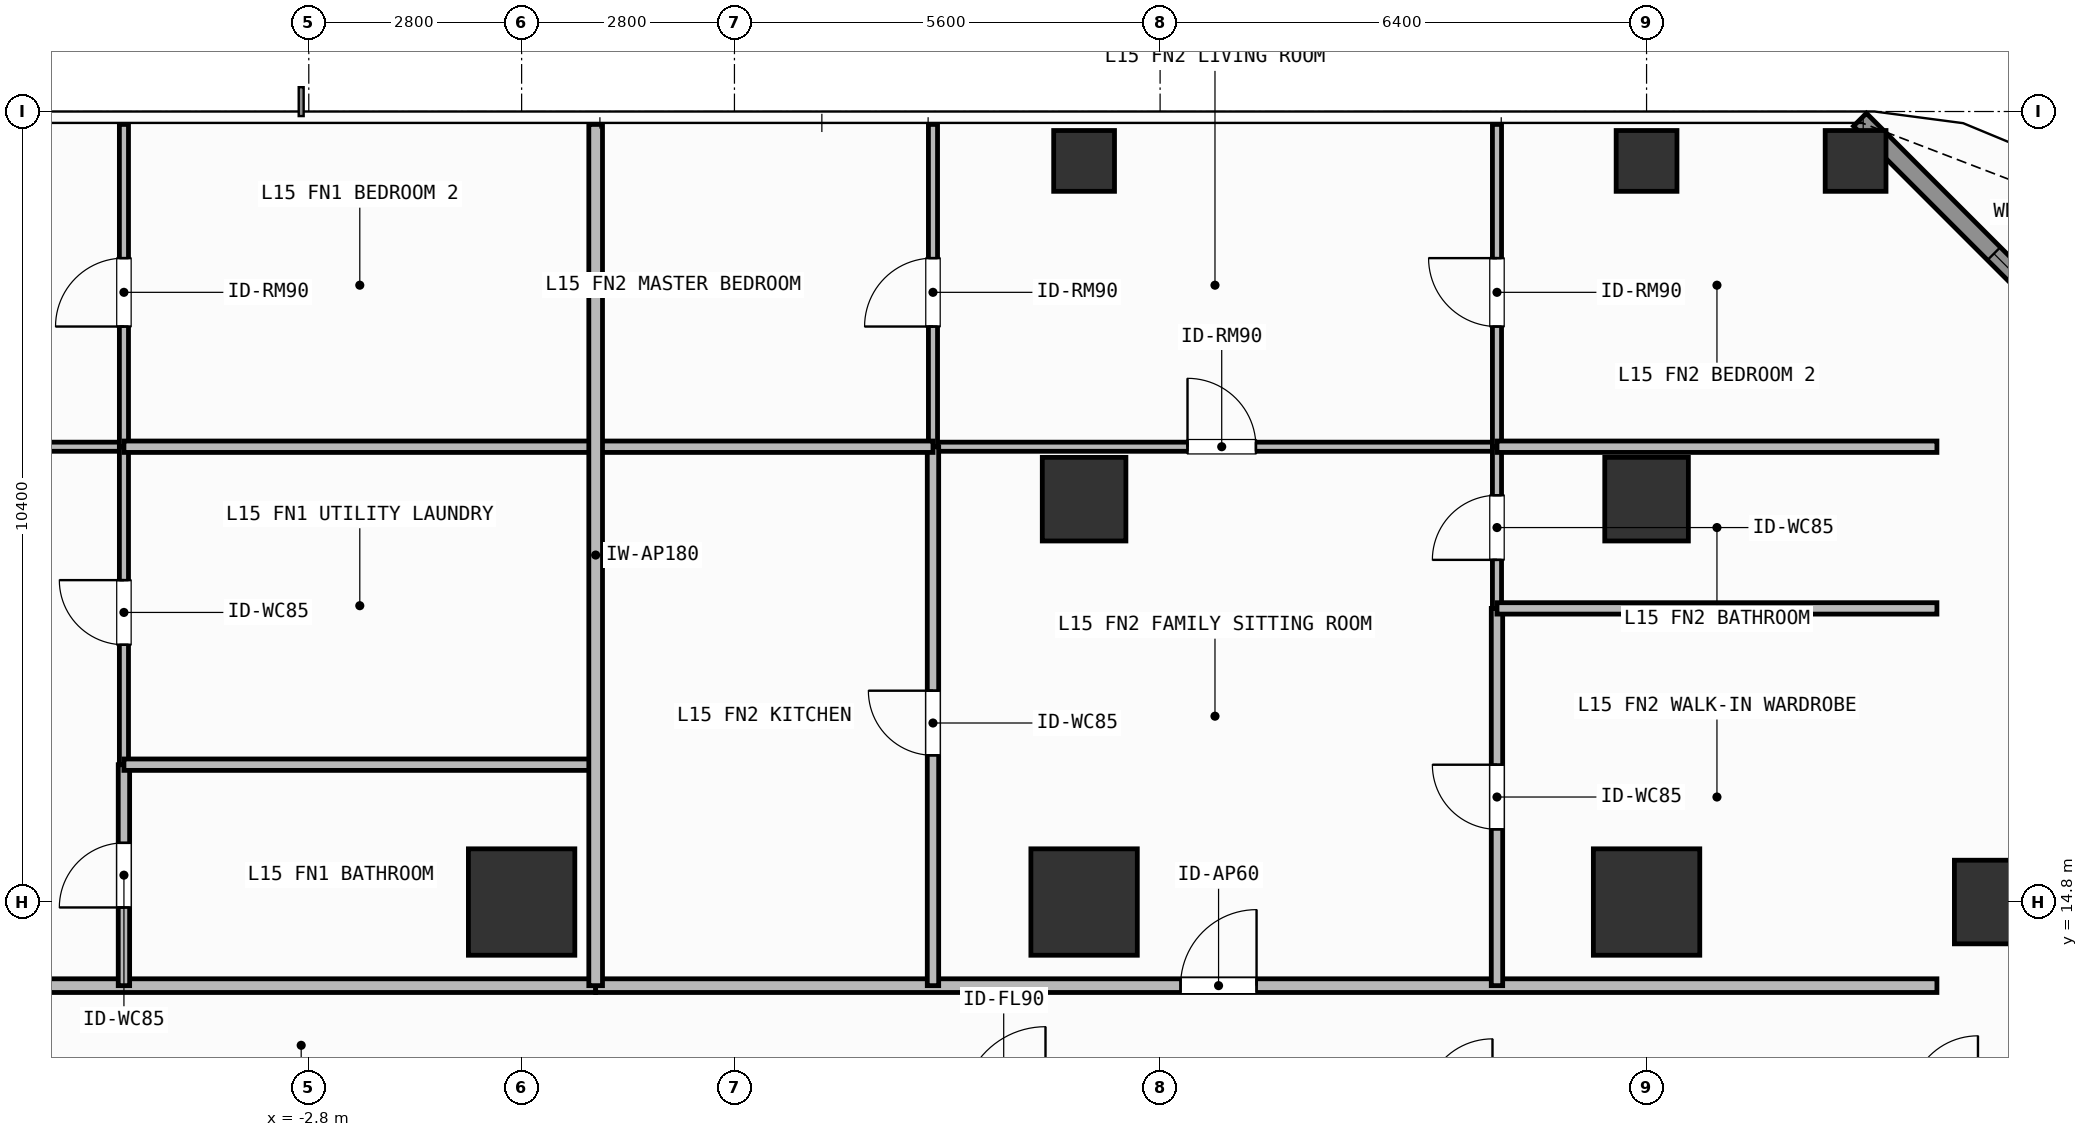
"""IFC4 building model, lengths in metres.
Left out: names, types, materials, properties, quantities, classifications, styles, units other than length and angle.
Written with IfcOpenShell. Run it as: python <this file> out.ifc"""

import sys

from ifc_helpers import new_model, si_unit, direction, frame, frame_2d, origin, origin_2d, place, context, subcontext, project, spatial, rectangle, hollow_rectangle, extrude, element, fill, save


model = new_model("IFC4")
c1 = context("Model", 3, precision=1e-05, world=origin(), true_north=direction((0.0, 1.0)))
c2 = subcontext(c1, "Body", "Model", "MODEL_VIEW")
j1 = project(units=[si_unit("LENGTHUNIT", "METRE"), si_unit("PLANEANGLEUNIT", "RADIAN")], contexts=[c1])
p1 = place(None, origin())
s1 = spatial("IfcSite", under=j1, at=p1, CompositionType="ELEMENT")
p2 = place(p1, origin())
s2 = spatial("IfcBuilding", under=s1, at=p2, CompositionType="ELEMENT")
p3 = place(p2, frame((0.0, 0.0, 57.9)))
s3 = spatial("IfcBuildingStorey", under=s2, at=p3, CompositionType="ELEMENT", Elevation=57.9)
for number, where, z_axis, x_axis in (
    (1, (0.0, 14.8, 0.0), (0.0, 0.0, 1.0), (1.0, 0.0, 0.0)),
    (2, (7.4, 14.8, 0.0), (0.0, 0.0, 1.0), (1.0, 0.0, 0.0)),
    (3, (14.8, 14.8, 0.0), (0.0, 0.0, 1.0), (1.0, 0.0, 0.0)),
):
    element("IfcColumn", number, at=place(p3, frame(where, z_axis=z_axis, x_axis=x_axis)), inside=s3, PredefinedType="COLUMN", context=c2, shape_type="SweptSolid", body=[
        extrude(rectangle(XDim=1.4, YDim=1.4, at=origin_2d()), origin(), (0.0, 0.0, 1.0), 3.9),
    ])
for number, where, z_axis, x_axis in (
    (4, (19.4, 14.8, 0.0), (0.0, 0.0, 1.0), (1.0, 0.0, 0.0)),
    (5, (7.4, 20.1, 0.0), (0.0, 0.0, 1.0), (1.0, 0.0, 0.0)),
    (6, (14.8, 20.1, 0.0), (0.0, 0.0, 1.0), (1.0, 0.0, 0.0)),
):
    element("IfcColumn", number, at=place(p3, frame(where, z_axis=z_axis, x_axis=x_axis)), inside=s3, PredefinedType="COLUMN", context=c2, shape_type="SweptSolid", body=[
        extrude(rectangle(XDim=1.1, YDim=1.1, at=origin_2d()), origin(), (0.0, 0.0, 1.0), 3.9),
    ])
for number, where, z_axis, x_axis in (
    (7, (17.55, 24.55, 0.0), (0.0, 0.0, 1.0), (1.0, 0.0, 0.0)),
    (8, (7.4, 24.55, 0.0), (0.0, 0.0, 1.0), (1.0, 0.0, 0.0)),
    (9, (14.8, 24.55, 0.0), (0.0, 0.0, 1.0), (1.0, 0.0, 0.0)),
):
    element("IfcColumn", number, at=place(p3, frame(where, z_axis=z_axis, x_axis=x_axis)), inside=s3, PredefinedType="COLUMN", context=c2, shape_type="SweptSolid", body=[
        extrude(hollow_rectangle(XDim=0.8, YDim=0.8, WallThickness=0.036, at=origin_2d()), origin(), (0.0, 0.0, 1.0), 3.9),
    ])
p4 = place(p3, frame((17.608, 25.092, 0.0), z_axis=(0.0, 0.0, 1.0), x_axis=(0.707106781187, -0.707106781187, 0.0)))
e10 = element("IfcWall", 10, at=p4, inside=s3, PredefinedType="SOLIDWALL", context=c2, shape_type="SweptSolid", body=[
    extrude(rectangle(XDim=6.484, YDim=0.24, at=frame_2d((3.242, 0.0))), origin(), (0.0, 0.0, 1.0), 3.68),
])
p5 = place(p4, frame((2.492, 0.0, 0.8)))
e11 = element("IfcOpeningElement", 11, at=p5, cuts=e10, PredefinedType="OPENING", context=c2, shape_type="SweptSolid", body=[
    extrude(rectangle(XDim=1.5, YDim=1.85, at=frame_2d((0.75, 0.925))), frame((0.0, 0.13, 0.0), z_axis=(0.0, -1.0, 0.0), x_axis=(1.0, 0.0, 0.0)), (0.0, 0.0, 1.0), 0.26),
])
p6 = place(p3, frame((-24.42, 13.7, 0.0), z_axis=(0.0, 0.0, 1.0), x_axis=(1.0, 0.0, 0.0)))
e12 = element("IfcWall", 12, at=p6, inside=s3, PredefinedType="PARTITIONING", context=c2, shape_type="SweptSolid", body=[
    extrude(rectangle(XDim=25.394, YDim=0.18, at=frame_2d((12.697, 0.0))), origin(), (0.0, 0.0, 1.0), 3.68),
])
p7 = place(p6, frame((10.4, 0.0, 0.0)))
e13 = element("IfcOpeningElement", 13, at=p7, cuts=e12, PredefinedType="OPENING", context=c2, shape_type="SweptSolid", body=[
    extrude(rectangle(XDim=1.0, YDim=2.2, at=frame_2d((0.5, 1.1))), frame((0.0, 0.1, 0.0), z_axis=(0.0, -1.0, 0.0), x_axis=(1.0, 0.0, 0.0)), (0.0, 0.0, 1.0), 0.2),
])
p8 = place(p3, frame((-12.805, 20.79, 0.0), z_axis=(0.0, 0.0, 1.0), x_axis=(1.0, 0.0, 0.0)))
e14 = element("IfcWall", 14, at=p8, inside=s3, PredefinedType="PARTITIONING", context=c2, shape_type="SweptSolid", body=[
    extrude(rectangle(XDim=7.573, YDim=0.12, at=frame_2d((3.787, 0.0))), origin(), (0.0, 0.0, 1.0), 3.68),
])
p9 = place(p8, frame((3.336, 0.0, 0.0)))
e15 = element("IfcOpeningElement", 15, at=p9, cuts=e14, PredefinedType="OPENING", context=c2, shape_type="SweptSolid", body=[
    extrude(rectangle(XDim=0.9, YDim=2.1, at=frame_2d((0.45, 1.05))), frame((0.0, 0.07, 0.0), z_axis=(0.0, -1.0, 0.0), x_axis=(1.0, 0.0, 0.0)), (0.0, 0.0, 1.0), 0.14),
])
p10 = place(p3, frame((-5.232, 13.7, 0.0), z_axis=(0.0, 0.0, 1.0), x_axis=(0.0, 1.0, 0.0)))
e16 = element("IfcWall", 16, at=p10, inside=s3, PredefinedType="PARTITIONING", context=c2, shape_type="SweptSolid", body=[
    extrude(rectangle(XDim=2.907, YDim=0.15, at=frame_2d((1.454, 0.0))), origin(), (0.0, 0.0, 1.0), 3.68),
])
p11 = place(p10, frame((1.029, 0.0, 0.0)))
e17 = element("IfcOpeningElement", 17, at=p11, cuts=e16, PredefinedType="OPENING", context=c2, shape_type="SweptSolid", body=[
    extrude(rectangle(XDim=0.85, YDim=2.1, at=frame_2d((0.425, 1.05))), frame((0.0, 0.085, 0.0), z_axis=(0.0, -1.0, 0.0), x_axis=(1.0, 0.0, 0.0)), (0.0, 0.0, 1.0), 0.17),
])
p12 = place(p3, frame((-5.232, 16.607, 0.0), z_axis=(0.0, 0.0, 1.0), x_axis=(0.0, 1.0, 0.0)))
e18 = element("IfcWall", 18, at=p12, inside=s3, PredefinedType="PARTITIONING", context=c2, shape_type="SweptSolid", body=[
    extrude(rectangle(XDim=4.183, YDim=0.12, at=frame_2d((2.092, 0.0))), origin(), (0.0, 0.0, 1.0), 3.68),
])
p13 = place(p12, frame((1.578, 0.0, 0.0)))
e19 = element("IfcOpeningElement", 19, at=p13, cuts=e18, PredefinedType="OPENING", context=c2, shape_type="SweptSolid", body=[
    extrude(rectangle(XDim=0.85, YDim=2.1, at=frame_2d((0.425, 1.05))), frame((0.0, 0.07, 0.0), z_axis=(0.0, -1.0, 0.0), x_axis=(1.0, 0.0, 0.0)), (0.0, 0.0, 1.0), 0.14),
])
p14 = place(p3, frame((-5.232, 20.79, 0.0), z_axis=(0.0, 0.0, 1.0), x_axis=(0.0, 1.0, 0.0)))
e20 = element("IfcWall", 20, at=p14, inside=s3, PredefinedType="PARTITIONING", context=c2, shape_type="SweptSolid", body=[
    extrude(rectangle(XDim=4.24, YDim=0.12, at=frame_2d((2.12, 0.0))), origin(), (0.0, 0.0, 1.0), 3.68),
])
p15 = place(p14, frame((1.581, 0.0, 0.0)))
e21 = element("IfcOpeningElement", 21, at=p15, cuts=e20, PredefinedType="OPENING", context=c2, shape_type="SweptSolid", body=[
    extrude(rectangle(XDim=0.9, YDim=2.1, at=frame_2d((0.45, 1.05))), frame((0.0, 0.07, 0.0), z_axis=(0.0, -1.0, 0.0), x_axis=(1.0, 0.0, 0.0)), (0.0, 0.0, 1.0), 0.14),
])
p16 = place(p3, frame((0.974, 13.7, 0.0), z_axis=(0.0, 0.0, 1.0), x_axis=(1.0, 0.0, 0.0)))
e22 = element("IfcWall", 22, at=p16, inside=s3, PredefinedType="PARTITIONING", context=c2, shape_type="SweptSolid", body=[
    extrude(rectangle(XDim=17.646, YDim=0.18, at=frame_2d((8.823, 0.0))), origin(), (0.0, 0.0, 1.0), 3.68),
])
p17 = place(p16, frame((7.695, 0.0, 0.0)))
e23 = element("IfcOpeningElement", 23, at=p17, cuts=e22, PredefinedType="OPENING", context=c2, shape_type="SweptSolid", body=[
    extrude(rectangle(XDim=1.0, YDim=2.2, at=frame_2d((0.5, 1.1))), frame((0.0, 0.1, 0.0), z_axis=(0.0, -1.0, 0.0), x_axis=(1.0, 0.0, 0.0)), (0.0, 0.0, 1.0), 0.2),
])
p18 = place(p3, frame((5.412, 20.79, 0.0), z_axis=(0.0, 0.0, 1.0), x_axis=(1.0, 0.0, 0.0)))
e24 = element("IfcWall", 24, at=p18, inside=s3, PredefinedType="PARTITIONING", context=c2, shape_type="SweptSolid", body=[
    extrude(rectangle(XDim=7.42, YDim=0.12, at=frame_2d((3.71, 0.0))), origin(), (0.0, 0.0, 1.0), 3.68),
])
p19 = place(p18, frame((3.349, 0.0, 0.0)))
e25 = element("IfcOpeningElement", 25, at=p19, cuts=e24, PredefinedType="OPENING", context=c2, shape_type="SweptSolid", body=[
    extrude(rectangle(XDim=0.9, YDim=2.1, at=frame_2d((0.45, 1.05))), frame((0.0, 0.07, 0.0), z_axis=(0.0, -1.0, 0.0), x_axis=(1.0, 0.0, 0.0)), (0.0, 0.0, 1.0), 0.14),
])
p20 = place(p3, frame((5.412, 13.7, 0.0), z_axis=(0.0, 0.0, 1.0), x_axis=(0.0, 1.0, 0.0)))
e26 = element("IfcWall", 26, at=p20, inside=s3, PredefinedType="PARTITIONING", context=c2, shape_type="SweptSolid", body=[
    extrude(rectangle(XDim=7.09, YDim=0.15, at=frame_2d((3.545, 0.0))), origin(), (0.0, 0.0, 1.0), 3.68),
])
p21 = place(p20, frame((3.03, 0.0, 0.0)))
e27 = element("IfcOpeningElement", 27, at=p21, cuts=e26, PredefinedType="OPENING", context=c2, shape_type="SweptSolid", body=[
    extrude(rectangle(XDim=0.85, YDim=2.1, at=frame_2d((0.425, 1.05))), frame((0.0, 0.085, 0.0), z_axis=(0.0, -1.0, 0.0), x_axis=(1.0, 0.0, 0.0)), (0.0, 0.0, 1.0), 0.17),
])
p22 = place(p3, frame((5.412, 20.79, 0.0), z_axis=(0.0, 0.0, 1.0), x_axis=(0.0, 1.0, 0.0)))
e28 = element("IfcWall", 28, at=p22, inside=s3, PredefinedType="PARTITIONING", context=c2, shape_type="SweptSolid", body=[
    extrude(rectangle(XDim=4.24, YDim=0.12, at=frame_2d((2.12, 0.0))), origin(), (0.0, 0.0, 1.0), 3.68),
])
p23 = place(p22, frame((1.581, 0.0, 0.0)))
e29 = element("IfcOpeningElement", 29, at=p23, cuts=e28, PredefinedType="OPENING", context=c2, shape_type="SweptSolid", body=[
    extrude(rectangle(XDim=0.9, YDim=2.1, at=frame_2d((0.45, 1.05))), frame((0.0, 0.07, 0.0), z_axis=(0.0, -1.0, 0.0), x_axis=(1.0, 0.0, 0.0)), (0.0, 0.0, 1.0), 0.14),
])
p24 = place(p3, frame((12.832, 13.7, 0.0), z_axis=(0.0, 0.0, 1.0), x_axis=(0.0, 1.0, 0.0)))
e30 = element("IfcWall", 30, at=p24, inside=s3, PredefinedType="PARTITIONING", context=c2, shape_type="SweptSolid", body=[
    extrude(rectangle(XDim=4.963, YDim=0.15, at=frame_2d((2.481, 0.0))), origin(), (0.0, 0.0, 1.0), 3.68),
])
p25 = place(p24, frame((2.056, 0.0, 0.0)))
e31 = element("IfcOpeningElement", 31, at=p25, cuts=e30, PredefinedType="OPENING", context=c2, shape_type="SweptSolid", body=[
    extrude(rectangle(XDim=0.85, YDim=2.1, at=frame_2d((0.425, 1.05))), frame((0.0, 0.085, 0.0), z_axis=(0.0, -1.0, 0.0), x_axis=(1.0, 0.0, 0.0)), (0.0, 0.0, 1.0), 0.17),
])
p26 = place(p3, frame((12.832, 18.663, 0.0), z_axis=(0.0, 0.0, 1.0), x_axis=(0.0, 1.0, 0.0)))
e32 = element("IfcWall", 32, at=p26, inside=s3, PredefinedType="PARTITIONING", context=c2, shape_type="SweptSolid", body=[
    extrude(rectangle(XDim=2.127, YDim=0.12, at=frame_2d((1.063, 0.0))), origin(), (0.0, 0.0, 1.0), 3.68),
])
p27 = place(p26, frame((0.638, 0.0, 0.0)))
e33 = element("IfcOpeningElement", 33, at=p27, cuts=e32, PredefinedType="OPENING", context=c2, shape_type="SweptSolid", body=[
    extrude(rectangle(XDim=0.85, YDim=2.1, at=frame_2d((0.425, 1.05))), frame((0.0, 0.07, 0.0), z_axis=(0.0, -1.0, 0.0), x_axis=(1.0, 0.0, 0.0)), (0.0, 0.0, 1.0), 0.14),
])
p28 = place(p3, frame((12.832, 20.79, 0.0), z_axis=(0.0, 0.0, 1.0), x_axis=(0.0, 1.0, 0.0)))
e34 = element("IfcWall", 34, at=p28, inside=s3, PredefinedType="PARTITIONING", context=c2, shape_type="SweptSolid", body=[
    extrude(rectangle(XDim=4.24, YDim=0.12, at=frame_2d((2.12, 0.0))), origin(), (0.0, 0.0, 1.0), 3.68),
])
p29 = place(p28, frame((1.581, 0.0, 0.0)))
e35 = element("IfcOpeningElement", 35, at=p29, cuts=e34, PredefinedType="OPENING", context=c2, shape_type="SweptSolid", body=[
    extrude(rectangle(XDim=0.9, YDim=2.1, at=frame_2d((0.45, 1.05))), frame((0.0, 0.07, 0.0), z_axis=(0.0, -1.0, 0.0), x_axis=(1.0, 0.0, 0.0)), (0.0, 0.0, 1.0), 0.14),
])
for number, where, z_axis, x_axis in (
    (36, (-5.232, 16.607, 0.0), (0.0, 0.0, 1.0), (1.0, 0.0, 0.0)),
    (37, (-5.232, 20.79, 0.0), (0.0, 0.0, 1.0), (1.0, 0.0, 0.0)),
):
    element("IfcWall", number, at=place(p3, frame(where, z_axis=z_axis, x_axis=x_axis)), inside=s3, PredefinedType="PARTITIONING", context=c2, shape_type="SweptSolid", body=[
        extrude(rectangle(XDim=6.206, YDim=0.15, at=frame_2d((3.103, 0.0))), origin(), (0.0, 0.0, 1.0), 3.68),
    ])
p30 = place(p3, frame((0.974, 20.79, 0.0), z_axis=(0.0, 0.0, 1.0), x_axis=(1.0, 0.0, 0.0)))
e38 = element("IfcWall", 38, at=p30, inside=s3, PredefinedType="PARTITIONING", context=c2, shape_type="SweptSolid", body=[
    extrude(rectangle(XDim=4.438, YDim=0.15, at=frame_2d((2.219, 0.0))), origin(), (0.0, 0.0, 1.0), 3.68),
])
for number, where, z_axis, x_axis in (
    (39, (12.832, 18.663, 0.0), (0.0, 0.0, 1.0), (1.0, 0.0, 0.0)),
    (40, (12.832, 20.79, 0.0), (0.0, 0.0, 1.0), (1.0, 0.0, 0.0)),
):
    element("IfcWall", number, at=place(p3, frame(where, z_axis=z_axis, x_axis=x_axis)), inside=s3, PredefinedType="PARTITIONING", context=c2, shape_type="SweptSolid", body=[
        extrude(rectangle(XDim=5.788, YDim=0.15, at=frame_2d((2.894, 0.0))), origin(), (0.0, 0.0, 1.0), 3.68),
    ])
p31 = place(p3, frame((0.974, 13.7, 0.0), z_axis=(0.0, 0.0, 1.0), x_axis=(0.0, 1.0, 0.0)))
e41 = element("IfcWall", 41, at=p31, inside=s3, PredefinedType="PARTITIONING", context=c2, shape_type="SweptSolid", body=[
    extrude(rectangle(XDim=11.33, YDim=0.18, at=frame_2d((5.665, 0.0))), origin(), (0.0, 0.0, 1.0), 3.68),
])
p32 = place(p5, origin())
e42 = element("IfcWindow", 42, at=p32, inside=s3, PartitioningType="SINGLE_PANEL", PredefinedType="WINDOW", context=c2, shape_type="SweptSolid", body=[
    extrude(rectangle(XDim=1.5, YDim=1.85, at=frame_2d((0.75, 0.925))), frame((0.0, 0.03, 0.0), z_axis=(0.0, -1.0, 0.0), x_axis=(1.0, 0.0, 0.0)), (0.0, 0.0, 1.0), 0.06),
])
fill(e11, e42)
p33 = place(p11, origin())
e43 = element("IfcDoor", 43, at=p33, inside=s3, OperationType="SINGLE_SWING_LEFT", PredefinedType="DOOR", context=c2, shape_type="SweptSolid", body=[
    extrude(rectangle(XDim=0.85, YDim=2.1, at=frame_2d((0.425, 1.05))), frame((0.0, 0.025, 0.0), z_axis=(0.0, -1.0, 0.0), x_axis=(1.0, 0.0, 0.0)), (0.0, 0.0, 1.0), 0.05),
])
fill(e17, e43)
p34 = place(p13, origin())
e44 = element("IfcDoor", 44, at=p34, inside=s3, OperationType="SINGLE_SWING_RIGHT", PredefinedType="DOOR", context=c2, shape_type="SweptSolid", body=[
    extrude(rectangle(XDim=0.85, YDim=2.1, at=frame_2d((0.425, 1.05))), frame((0.0, 0.025, 0.0), z_axis=(0.0, -1.0, 0.0), x_axis=(1.0, 0.0, 0.0)), (0.0, 0.0, 1.0), 0.05),
])
fill(e19, e44)
p35 = place(p15, origin())
e45 = element("IfcDoor", 45, at=p35, inside=s3, OperationType="SINGLE_SWING_LEFT", PredefinedType="DOOR", context=c2, shape_type="SweptSolid", body=[
    extrude(rectangle(XDim=0.9, YDim=2.1, at=frame_2d((0.45, 1.05))), frame((0.0, 0.025, 0.0), z_axis=(0.0, -1.0, 0.0), x_axis=(1.0, 0.0, 0.0)), (0.0, 0.0, 1.0), 0.05),
])
fill(e21, e45)
p36 = place(p17, origin())
e46 = element("IfcDoor", 46, at=p36, inside=s3, OperationType="SINGLE_SWING_RIGHT", PredefinedType="DOOR", context=c2, shape_type="SweptSolid", body=[
    extrude(rectangle(XDim=1.0, YDim=2.2, at=frame_2d((0.5, 1.1))), frame((0.0, 0.025, 0.0), z_axis=(0.0, -1.0, 0.0), x_axis=(1.0, 0.0, 0.0)), (0.0, 0.0, 1.0), 0.05),
])
fill(e23, e46)
p37 = place(p19, origin())
e47 = element("IfcDoor", 47, at=p37, inside=s3, OperationType="SINGLE_SWING_LEFT", PredefinedType="DOOR", context=c2, shape_type="SweptSolid", body=[
    extrude(rectangle(XDim=0.9, YDim=2.1, at=frame_2d((0.45, 1.05))), frame((0.0, 0.025, 0.0), z_axis=(0.0, -1.0, 0.0), x_axis=(1.0, 0.0, 0.0)), (0.0, 0.0, 1.0), 0.05),
])
fill(e25, e47)
p38 = place(p21, origin())
e48 = element("IfcDoor", 48, at=p38, inside=s3, OperationType="SINGLE_SWING_RIGHT", PredefinedType="DOOR", context=c2, shape_type="SweptSolid", body=[
    extrude(rectangle(XDim=0.85, YDim=2.1, at=frame_2d((0.425, 1.05))), frame((0.0, 0.025, 0.0), z_axis=(0.0, -1.0, 0.0), x_axis=(1.0, 0.0, 0.0)), (0.0, 0.0, 1.0), 0.05),
])
fill(e27, e48)
p39 = place(p23, origin())
e49 = element("IfcDoor", 49, at=p39, inside=s3, OperationType="SINGLE_SWING_LEFT", PredefinedType="DOOR", context=c2, shape_type="SweptSolid", body=[
    extrude(rectangle(XDim=0.9, YDim=2.1, at=frame_2d((0.45, 1.05))), frame((0.0, 0.025, 0.0), z_axis=(0.0, -1.0, 0.0), x_axis=(1.0, 0.0, 0.0)), (0.0, 0.0, 1.0), 0.05),
])
fill(e29, e49)
p40 = place(p25, origin())
e50 = element("IfcDoor", 50, at=p40, inside=s3, OperationType="SINGLE_SWING_RIGHT", PredefinedType="DOOR", context=c2, shape_type="SweptSolid", body=[
    extrude(rectangle(XDim=0.85, YDim=2.1, at=frame_2d((0.425, 1.05))), frame((0.0, 0.025, 0.0), z_axis=(0.0, -1.0, 0.0), x_axis=(1.0, 0.0, 0.0)), (0.0, 0.0, 1.0), 0.05),
])
fill(e31, e50)
p41 = place(p27, origin())
e51 = element("IfcDoor", 51, at=p41, inside=s3, OperationType="SINGLE_SWING_LEFT", PredefinedType="DOOR", context=c2, shape_type="SweptSolid", body=[
    extrude(rectangle(XDim=0.85, YDim=2.1, at=frame_2d((0.425, 1.05))), frame((0.0, 0.025, 0.0), z_axis=(0.0, -1.0, 0.0), x_axis=(1.0, 0.0, 0.0)), (0.0, 0.0, 1.0), 0.05),
])
fill(e33, e51)
p42 = place(p29, origin())
e52 = element("IfcDoor", 52, at=p42, inside=s3, OperationType="SINGLE_SWING_RIGHT", PredefinedType="DOOR", context=c2, shape_type="SweptSolid", body=[
    extrude(rectangle(XDim=0.9, YDim=2.1, at=frame_2d((0.45, 1.05))), frame((0.0, 0.025, 0.0), z_axis=(0.0, -1.0, 0.0), x_axis=(1.0, 0.0, 0.0)), (0.0, 0.0, 1.0), 0.05),
])
fill(e35, e52)
save(model, sys.argv[1])
